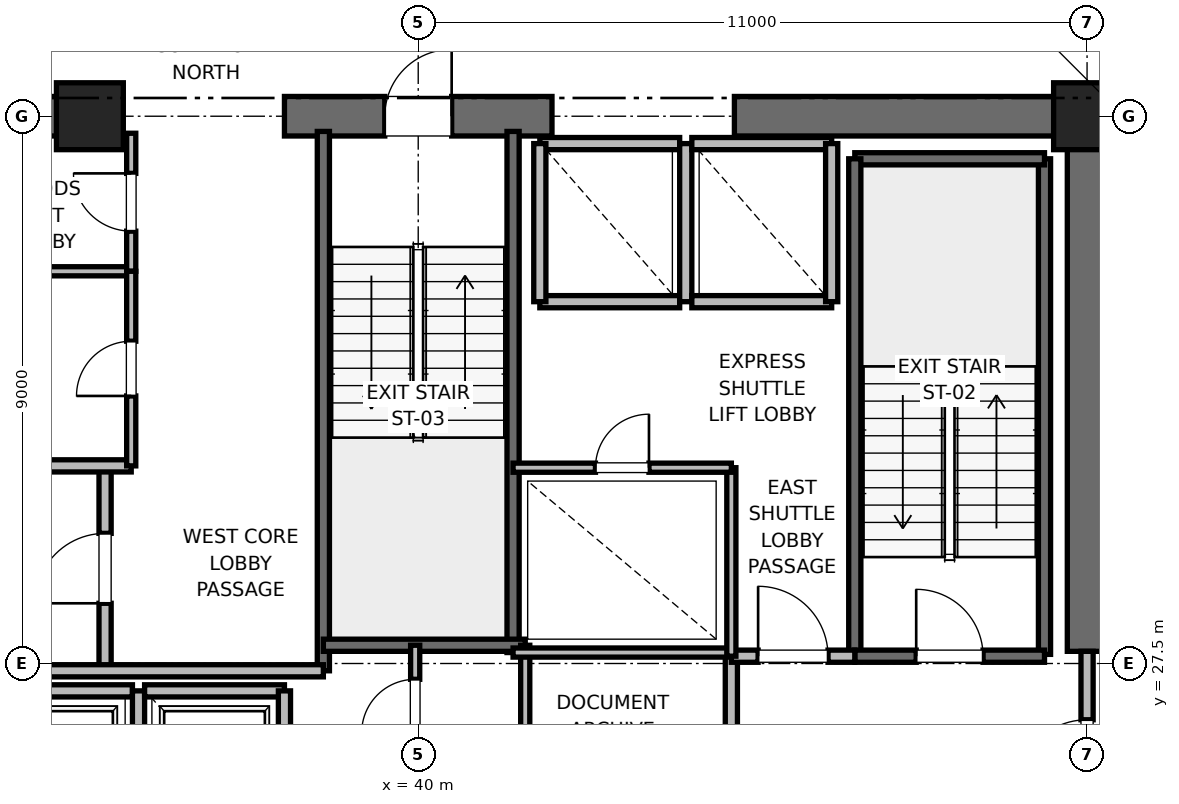
"""IFC4 building model, lengths in metres.
Left out: names, types, materials, properties, quantities, classifications, styles, units other than length and angle.
Written with IfcOpenShell. Run it as: python <this file> out.ifc"""

import sys

from ifc_helpers import new_model, si_unit, direction, frame, frame_2d, origin, origin_2d, place, context, subcontext, project, spatial, rectangle, extrude, element, fill, save


model = new_model("IFC4")
c1 = context("Model", 3, precision=1e-05, world=origin(), true_north=direction((0.0, 1.0)))
c2 = subcontext(c1, "Body", "Model", "MODEL_VIEW")
j1 = project(units=[si_unit("LENGTHUNIT", "METRE"), si_unit("PLANEANGLEUNIT", "RADIAN")], contexts=[c1])
p1 = place(None, origin())
s1 = spatial("IfcSite", under=j1, at=p1, CompositionType="ELEMENT")
p2 = place(p1, origin())
s2 = spatial("IfcBuilding", under=s1, at=p2, CompositionType="ELEMENT")
p3 = place(p2, frame((0.0, 0.0, 103.6)))
s3 = spatial("IfcBuildingStorey", under=s2, at=p3, CompositionType="ELEMENT", Elevation=103.6)
for number, where, z_axis, x_axis in (
    (1, (51.0, 36.5, 0.0), (0.0, 0.0, 1.0), (1.0, 0.0, 0.0)),
    (2, (34.6, 36.5, 0.0), (0.0, 0.0, 1.0), (1.0, 0.0, 0.0)),
):
    element("IfcColumn", number, at=place(p3, frame(where, z_axis=z_axis, x_axis=x_axis)), inside=s3, PredefinedType="PILASTER", context=c2, shape_type="SweptSolid", body=[
        extrude(rectangle(XDim=1.1, YDim=1.1, at=origin_2d()), origin(), (0.0, 0.0, 1.0), 4.0),
    ])
p4 = place(p3, frame((29.0, 36.5, 0.0), z_axis=(0.0, 0.0, 1.0), x_axis=(1.0, 0.0, 0.0)))
e3 = element("IfcWall", 3, at=p4, inside=s3, PredefinedType="SHEAR", context=c2, shape_type="SweptSolid", body=[
    extrude(rectangle(XDim=5.8, YDim=0.65, at=frame_2d((2.9, 0.0))), origin(), (0.0, 0.0, 1.0), 3.7),
])
p5 = place(p3, frame((37.8, 36.5, 0.0), z_axis=(0.0, 0.0, 1.0), x_axis=(1.0, 0.0, 0.0)))
e4 = element("IfcWall", 4, at=p5, inside=s3, PredefinedType="SHEAR", context=c2, shape_type="SweptSolid", body=[
    extrude(rectangle(XDim=4.4, YDim=0.65, at=frame_2d((2.2, 0.0))), origin(), (0.0, 0.0, 1.0), 3.7),
])
p6 = place(p5, frame((1.65, 0.0, 0.0)))
e5 = element("IfcOpeningElement", 5, at=p6, cuts=e4, PredefinedType="OPENING", context=c2, shape_type="SweptSolid", body=[
    extrude(rectangle(XDim=1.1, YDim=2.15, at=frame_2d((0.55, 1.075))), frame((0.0, 0.325, 0.0), z_axis=(0.0, -1.0, 0.0), x_axis=(1.0, 0.0, 0.0)), (0.0, 0.0, 1.0), 0.65),
])
p7 = place(p3, frame((45.2, 36.5, 0.0), z_axis=(0.0, 0.0, 1.0), x_axis=(1.0, 0.0, 0.0)))
e6 = element("IfcWall", 6, at=p7, inside=s3, PredefinedType="SHEAR", context=c2, shape_type="SweptSolid", body=[
    extrude(rectangle(XDim=5.8, YDim=0.65, at=frame_2d((2.9, 0.0))), origin(), (0.0, 0.0, 1.0), 3.7),
])
p8 = place(p3, frame((51.0, 27.7, 0.0), z_axis=(0.0, 0.0, 1.0), x_axis=(0.0, 1.0, 0.0)))
e7 = element("IfcWall", 7, at=p8, inside=s3, PredefinedType="SHEAR", context=c2, shape_type="SweptSolid", body=[
    extrude(rectangle(XDim=8.8, YDim=0.65, at=frame_2d((4.4, 0.0))), origin(), (0.0, 0.0, 1.0), 3.7),
])
p9 = place(p3, frame((50.3, 27.65, 0.0), z_axis=(0.0, 0.0, 1.0), x_axis=(0.0, 1.0, 0.0)))
e8 = element("IfcWall", 8, at=p9, inside=s3, PredefinedType="SOLIDWALL", context=c2, shape_type="SweptSolid", body=[
    extrude(rectangle(XDim=8.15, YDim=0.2, at=frame_2d((4.075, 0.0))), origin(), (0.0, 0.0, 1.0), 3.7),
])
p10 = place(p3, frame((47.18, 35.8, 0.0), z_axis=(0.0, 0.0, 1.0), x_axis=(1.0, 0.0, 0.0)))
e9 = element("IfcWall", 9, at=p10, inside=s3, PredefinedType="SOLIDWALL", context=c2, shape_type="SweptSolid", body=[
    extrude(rectangle(XDim=3.12, YDim=0.2, at=frame_2d((1.56, 0.0))), origin(), (0.0, 0.0, 1.0), 3.7),
])
p11 = place(p3, frame((47.18, 27.62, 0.0), z_axis=(0.0, 0.0, 1.0), x_axis=(0.0, 1.0, 0.0)))
e10 = element("IfcWall", 10, at=p11, inside=s3, PredefinedType="SOLIDWALL", context=c2, shape_type="SweptSolid", body=[
    extrude(rectangle(XDim=8.18, YDim=0.2, at=frame_2d((4.09, 0.0))), origin(), (0.0, 0.0, 1.0), 3.7),
])
p12 = place(p3, frame((47.18, 27.62, 0.0), z_axis=(0.0, 0.0, 1.0), x_axis=(1.0, 0.0, 0.0)))
e11 = element("IfcWall", 11, at=p12, inside=s3, PredefinedType="SOLIDWALL", context=c2, shape_type="SweptSolid", body=[
    extrude(rectangle(XDim=3.12, YDim=0.2, at=frame_2d((1.56, 0.0))), origin(), (0.0, 0.0, 1.0), 3.7),
])
p13 = place(p12, frame((1.01, 0.0, 0.0)))
e12 = element("IfcOpeningElement", 12, at=p13, cuts=e11, PredefinedType="OPENING", context=c2, shape_type="SweptSolid", body=[
    extrude(rectangle(XDim=1.1, YDim=2.15, at=frame_2d((0.55, 1.075))), frame((0.0, 0.1, 0.0), z_axis=(0.0, -1.0, 0.0), x_axis=(1.0, 0.0, 0.0)), (0.0, 0.0, 1.0), 0.2),
])
p14 = place(p3, frame((38.44, 27.38, 0.0), z_axis=(0.0, 0.0, 1.0), x_axis=(0.0, 1.0, 0.0)))
e13 = element("IfcWall", 13, at=p14, inside=s3, PredefinedType="SOLIDWALL", context=c2, shape_type="SweptSolid", body=[
    extrude(rectangle(XDim=8.87, YDim=0.2, at=frame_2d((4.435, 0.0))), origin(), (0.0, 0.0, 1.0), 3.7),
])
p15 = place(p3, frame((41.56, 27.68, 0.0), z_axis=(0.0, 0.0, 1.0), x_axis=(0.0, 1.0, 0.0)))
e14 = element("IfcWall", 14, at=p15, inside=s3, PredefinedType="SOLIDWALL", context=c2, shape_type="SweptSolid", body=[
    extrude(rectangle(XDim=8.57, YDim=0.2, at=frame_2d((4.285, 0.0))), origin(), (0.0, 0.0, 1.0), 3.7),
])
p16 = place(p3, frame((38.44, 27.8, 0.0), z_axis=(0.0, 0.0, 1.0), x_axis=(1.0, 0.0, 0.0)))
e15 = element("IfcWall", 15, at=p16, inside=s3, PredefinedType="SOLIDWALL", context=c2, shape_type="SweptSolid", body=[
    extrude(rectangle(XDim=3.32, YDim=0.2, at=frame_2d((1.66, 0.0))), origin(), (0.0, 0.0, 1.0), 3.7),
])
p17 = place(p3, frame((34.85, 27.38, 0.0), z_axis=(0.0, 0.0, 1.0), x_axis=(0.0, 1.0, 0.0)))
e16 = element("IfcWall", 16, at=p17, inside=s3, PredefinedType="PARTITIONING", context=c2, shape_type="SweptSolid", body=[
    extrude(rectangle(XDim=3.37, YDim=0.2, at=frame_2d((1.685, 0.0))), origin(), (0.0, 0.0, 1.0), 3.7),
])
p18 = place(p17, frame((1.11, 0.0, 0.0)))
e17 = element("IfcOpeningElement", 17, at=p18, cuts=e16, PredefinedType="OPENING", context=c2, shape_type="SweptSolid", body=[
    extrude(rectangle(XDim=1.15, YDim=2.2, at=frame_2d((0.575, 1.1))), frame((0.0, 0.1, 0.0), z_axis=(0.0, -1.0, 0.0), x_axis=(1.0, 0.0, 0.0)), (0.0, 0.0, 1.0), 0.2),
])
p19 = place(p3, frame((32.82, 27.38, 0.0), z_axis=(0.0, 0.0, 1.0), x_axis=(1.0, 0.0, 0.0)))
e18 = element("IfcWall", 18, at=p19, inside=s3, PredefinedType="PARTITIONING", context=c2, shape_type="SweptSolid", body=[
    extrude(rectangle(XDim=5.62, YDim=0.2, at=frame_2d((2.81, 0.0))), origin(), (0.0, 0.0, 1.0), 3.7),
])
p20 = place(p3, frame((32.15, 30.75, 0.0), z_axis=(0.0, 0.0, 1.0), x_axis=(1.0, 0.0, 0.0)))
e19 = element("IfcWall", 19, at=p20, inside=s3, PredefinedType="PARTITIONING", context=c2, shape_type="SweptSolid", body=[
    extrude(rectangle(XDim=3.13, YDim=0.2, at=frame_2d((1.565, 0.0))), origin(), (0.0, 0.0, 1.0), 3.7),
])
p21 = place(p3, frame((45.15, 24.25, 0.0), z_axis=(0.0, 0.0, 1.0), x_axis=(0.0, 1.0, 0.0)))
e20 = element("IfcWall", 20, at=p21, inside=s3, PredefinedType="PARTITIONING", context=c2, shape_type="SweptSolid", body=[
    extrude(rectangle(XDim=3.37, YDim=0.2, at=frame_2d((1.685, 0.0))), origin(), (0.0, 0.0, 1.0), 3.7),
])
p22 = place(p3, frame((45.15, 27.62, 0.0), z_axis=(0.0, 0.0, 1.0), x_axis=(1.0, 0.0, 0.0)))
e21 = element("IfcWall", 21, at=p22, inside=s3, PredefinedType="PARTITIONING", context=c2, shape_type="SweptSolid", body=[
    extrude(rectangle(XDim=2.03, YDim=0.2, at=frame_2d((1.015, 0.0))), origin(), (0.0, 0.0, 1.0), 3.7),
])
p23 = place(p22, frame((0.44, 0.0, 0.0)))
e22 = element("IfcOpeningElement", 22, at=p23, cuts=e21, PredefinedType="OPENING", context=c2, shape_type="SweptSolid", body=[
    extrude(rectangle(XDim=1.15, YDim=2.2, at=frame_2d((0.575, 1.1))), frame((0.0, 0.1, 0.0), z_axis=(0.0, -1.0, 0.0), x_axis=(1.0, 0.0, 0.0)), (0.0, 0.0, 1.0), 0.2),
])
p24 = place(p3, frame((51.0, 24.3, 0.0), z_axis=(0.0, 0.0, 1.0), x_axis=(0.0, 1.0, 0.0)))
e23 = element("IfcWall", 23, at=p24, inside=s3, PredefinedType="PARTITIONING", context=c2, shape_type="SweptSolid", body=[
    extrude(rectangle(XDim=3.4, YDim=0.2, at=frame_2d((1.7, 0.0))), origin(), (0.0, 0.0, 1.0), 2.48),
])
p25 = place(p24, frame((1.125, 0.0, 0.0)))
e24 = element("IfcOpeningElement", 24, at=p25, cuts=e23, PredefinedType="OPENING", context=c2, shape_type="SweptSolid", body=[
    extrude(rectangle(XDim=1.15, YDim=2.2, at=frame_2d((0.575, 1.1))), frame((0.0, 0.1, 0.0), z_axis=(0.0, -1.0, 0.0), x_axis=(1.0, 0.0, 0.0)), (0.0, 0.0, 1.0), 0.2),
])
p26 = place(p3, frame((35.3, 27.05, 0.0), z_axis=(0.0, 0.0, 1.0), x_axis=(-1.0, 0.0, 0.0)))
e25 = element("IfcWall", 25, at=p26, inside=s3, PredefinedType="SOLIDWALL", context=c2, shape_type="SweptSolid", body=[
    extrude(rectangle(XDim=2.3, YDim=0.2, at=frame_2d((1.15, 0.0))), origin(), (0.0, 0.0, 1.0), 3.7),
])
p27 = place(p3, frame((35.4, 24.45, 0.0), z_axis=(0.0, 0.0, 1.0), x_axis=(0.0, 1.0, 0.0)))
e26 = element("IfcWall", 26, at=p27, inside=s3, PredefinedType="SOLIDWALL", context=c2, shape_type="SweptSolid", body=[
    extrude(rectangle(XDim=2.6, YDim=0.2, at=frame_2d((1.3, 0.0))), origin(), (0.0, 0.0, 1.0), 3.7),
])
p28 = place(p3, frame((37.8, 27.05, 0.0), z_axis=(0.0, 0.0, 1.0), x_axis=(-1.0, 0.0, 0.0)))
e27 = element("IfcWall", 27, at=p28, inside=s3, PredefinedType="SOLIDWALL", context=c2, shape_type="SweptSolid", body=[
    extrude(rectangle(XDim=2.3, YDim=0.2, at=frame_2d((1.15, 0.0))), origin(), (0.0, 0.0, 1.0), 3.7),
])
p29 = place(p3, frame((37.8, 24.45, 0.0), z_axis=(0.0, 0.0, 1.0), x_axis=(0.0, 1.0, 0.0)))
e28 = element("IfcWall", 28, at=p29, inside=s3, PredefinedType="SOLIDWALL", context=c2, shape_type="SweptSolid", body=[
    extrude(rectangle(XDim=2.6, YDim=0.2, at=frame_2d((1.3, 0.0))), origin(), (0.0, 0.0, 1.0), 3.7),
])
p30 = place(p3, frame((42.0, 33.45, 0.0), z_axis=(0.0, 0.0, 1.0), x_axis=(1.0, 0.0, 0.0)))
e29 = element("IfcWall", 29, at=p30, inside=s3, PredefinedType="SOLIDWALL", context=c2, shape_type="SweptSolid", body=[
    extrude(rectangle(XDim=2.3, YDim=0.2, at=frame_2d((1.15, 0.0))), origin(), (0.0, 0.0, 1.0), 3.7),
])
p31 = place(p3, frame((44.3, 36.05, 0.0), z_axis=(0.0, 0.0, 1.0), x_axis=(-1.0, 0.0, 0.0)))
e30 = element("IfcWall", 30, at=p31, inside=s3, PredefinedType="SOLIDWALL", context=c2, shape_type="SweptSolid", body=[
    extrude(rectangle(XDim=2.3, YDim=0.2, at=frame_2d((1.15, 0.0))), origin(), (0.0, 0.0, 1.0), 2.48),
])
for number, where, z_axis, x_axis in (
    (31, (42.0, 36.05, 0.0), (0.0, 0.0, 1.0), (0.0, -1.0, 0.0)),
    (32, (44.4, 33.45, 0.0), (0.0, 0.0, 1.0), (0.0, 1.0, 0.0)),
):
    element("IfcWall", number, at=place(p3, frame(where, z_axis=z_axis, x_axis=x_axis)), inside=s3, PredefinedType="SOLIDWALL", context=c2, shape_type="SweptSolid", body=[
        extrude(rectangle(XDim=2.6, YDim=0.2, at=frame_2d((1.3, 0.0))), origin(), (0.0, 0.0, 1.0), 2.48),
    ])
p32 = place(p3, frame((44.5, 33.45, 0.0), z_axis=(0.0, 0.0, 1.0), x_axis=(1.0, 0.0, 0.0)))
e33 = element("IfcWall", 33, at=p32, inside=s3, PredefinedType="SOLIDWALL", context=c2, shape_type="SweptSolid", body=[
    extrude(rectangle(XDim=2.3, YDim=0.2, at=frame_2d((1.15, 0.0))), origin(), (0.0, 0.0, 1.0), 3.7),
])
p33 = place(p3, frame((46.8, 36.05, 0.0), z_axis=(0.0, 0.0, 1.0), x_axis=(-1.0, 0.0, 0.0)))
e34 = element("IfcWall", 34, at=p33, inside=s3, PredefinedType="SOLIDWALL", context=c2, shape_type="SweptSolid", body=[
    extrude(rectangle(XDim=2.3, YDim=0.2, at=frame_2d((1.15, 0.0))), origin(), (0.0, 0.0, 1.0), 2.48),
])
p34 = place(p3, frame((46.8, 33.45, 0.0), z_axis=(0.0, 0.0, 1.0), x_axis=(0.0, 1.0, 0.0)))
e35 = element("IfcWall", 35, at=p34, inside=s3, PredefinedType="SOLIDWALL", context=c2, shape_type="SweptSolid", body=[
    extrude(rectangle(XDim=2.6, YDim=0.2, at=frame_2d((1.3, 0.0))), origin(), (0.0, 0.0, 1.0), 3.7),
])
p35 = place(p3, frame((41.76, 23.8, 0.0), z_axis=(0.0, 0.0, 1.0), x_axis=(0.0, 1.0, 0.0)))
e36 = element("IfcWall", 36, at=p35, inside=s3, PredefinedType="PARTITIONING", context=c2, shape_type="SweptSolid", body=[
    extrude(rectangle(XDim=4.0, YDim=0.15, at=frame_2d((2.0, 0.0))), origin(), (0.0, 0.0, 1.0), 2.85),
])
p36 = place(p3, frame((39.95, 25.8, 0.0), z_axis=(0.0, 0.0, 1.0), x_axis=(0.0, 1.0, 0.0)))
e37 = element("IfcWall", 37, at=p36, inside=s3, PredefinedType="PARTITIONING", context=c2, shape_type="SweptSolid", body=[
    extrude(rectangle(XDim=2.0, YDim=0.15, at=frame_2d((1.0, 0.0))), origin(), (0.0, 0.0, 1.0), 2.85),
])
p37 = place(p36, frame((0.56, 0.0, 0.0)))
e38 = element("IfcOpeningElement", 38, at=p37, cuts=e37, PredefinedType="OPENING", context=c2, shape_type="SweptSolid", body=[
    extrude(rectangle(XDim=0.88, YDim=2.1, at=frame_2d((0.44, 1.05))), frame((0.0, 0.075, 0.0), z_axis=(0.0, -1.0, 0.0), x_axis=(1.0, 0.0, 0.0)), (0.0, 0.0, 1.0), 0.15),
])
p38 = place(p3, frame((32.15, 33.95, 0.0), z_axis=(0.0, 0.0, 1.0), x_axis=(1.0, 0.0, 0.0)))
e39 = element("IfcWall", 39, at=p38, inside=s3, PredefinedType="PARTITIONING", context=c2, shape_type="SweptSolid", body=[
    extrude(rectangle(XDim=3.13, YDim=0.15, at=frame_2d((1.565, 0.0))), origin(), (0.0, 0.0, 1.0), 2.85),
])
p39 = place(p3, frame((35.28, 33.95, 0.0), z_axis=(0.0, 0.0, 1.0), x_axis=(0.0, 1.0, 0.0)))
e40 = element("IfcWall", 40, at=p39, inside=s3, PredefinedType="PARTITIONING", context=c2, shape_type="SweptSolid", body=[
    extrude(rectangle(XDim=2.27, YDim=0.15, at=frame_2d((1.135, 0.0))), origin(), (0.0, 0.0, 1.0), 2.48),
])
p40 = place(p39, frame((0.66, 0.0, 0.0)))
e41 = element("IfcOpeningElement", 41, at=p40, cuts=e40, PredefinedType="OPENING", context=c2, shape_type="SweptSolid", body=[
    extrude(rectangle(XDim=0.95, YDim=2.15, at=frame_2d((0.475, 1.075))), frame((0.0, 0.075, 0.0), z_axis=(0.0, -1.0, 0.0), x_axis=(1.0, 0.0, 0.0)), (0.0, 0.0, 1.0), 0.15),
])
p41 = place(p3, frame((35.28, 30.75, 0.0), z_axis=(0.0, 0.0, 1.0), x_axis=(0.0, 1.0, 0.0)))
e42 = element("IfcWall", 42, at=p41, inside=s3, PredefinedType="PARTITIONING", context=c2, shape_type="SweptSolid", body=[
    extrude(rectangle(XDim=3.2, YDim=0.15, at=frame_2d((1.6, 0.0))), origin(), (0.0, 0.0, 1.0), 2.85),
])
p42 = place(p41, frame((1.15, 0.0, 0.0)))
e43 = element("IfcOpeningElement", 43, at=p42, cuts=e42, PredefinedType="OPENING", context=c2, shape_type="SweptSolid", body=[
    extrude(rectangle(XDim=0.9, YDim=2.1, at=frame_2d((0.45, 1.05))), frame((0.0, 0.075, 0.0), z_axis=(0.0, -1.0, 0.0), x_axis=(1.0, 0.0, 0.0)), (0.0, 0.0, 1.0), 0.15),
])
p43 = place(p3, frame((41.56, 27.68, 0.0), z_axis=(0.0, 0.0, 1.0), x_axis=(1.0, 0.0, 0.0)))
e44 = element("IfcWall", 44, at=p43, inside=s3, PredefinedType="PARTITIONING", context=c2, shape_type="SweptSolid", body=[
    extrude(rectangle(XDim=3.59, YDim=0.15, at=frame_2d((1.795, 0.0))), origin(), (0.0, 0.0, 1.0), 2.85),
])
p44 = place(p3, frame((45.15, 27.62, 0.0), z_axis=(0.0, 0.0, 1.0), x_axis=(0.0, 1.0, 0.0)))
e45 = element("IfcWall", 45, at=p44, inside=s3, PredefinedType="PARTITIONING", context=c2, shape_type="SweptSolid", body=[
    extrude(rectangle(XDim=3.1, YDim=0.15, at=frame_2d((1.55, 0.0))), origin(), (0.0, 0.0, 1.0), 2.85),
])
p45 = place(p3, frame((41.56, 30.72, 0.0), z_axis=(0.0, 0.0, 1.0), x_axis=(1.0, 0.0, 0.0)))
e46 = element("IfcWall", 46, at=p45, inside=s3, PredefinedType="PARTITIONING", context=c2, shape_type="SweptSolid", body=[
    extrude(rectangle(XDim=3.59, YDim=0.15, at=frame_2d((1.795, 0.0))), origin(), (0.0, 0.0, 1.0), 2.85),
])
p46 = place(p45, frame((1.355, 0.0, 0.0)))
e47 = element("IfcOpeningElement", 47, at=p46, cuts=e46, PredefinedType="OPENING", context=c2, shape_type="SweptSolid", body=[
    extrude(rectangle(XDim=0.88, YDim=2.1, at=frame_2d((0.44, 1.05))), frame((0.0, 0.075, 0.0), z_axis=(0.0, -1.0, 0.0), x_axis=(1.0, 0.0, 0.0)), (0.0, 0.0, 1.0), 0.15),
])
p47 = place(p13, origin())
e48 = element("IfcDoor", 48, at=p47, inside=s3, OperationType="SINGLE_SWING_LEFT", PredefinedType="DOOR", context=c2, shape_type="SweptSolid", body=[
    extrude(rectangle(XDim=1.1, YDim=2.15, at=frame_2d((0.55, 1.075))), frame((0.0, 0.025, 0.0), z_axis=(0.0, -1.0, 0.0), x_axis=(1.0, 0.0, 0.0)), (0.0, 0.0, 1.0), 0.05),
])
fill(e12, e48)
p48 = place(p6, origin())
e49 = element("IfcDoor", 49, at=p48, inside=s3, OperationType="SINGLE_SWING_RIGHT", PredefinedType="DOOR", context=c2, shape_type="SweptSolid", body=[
    extrude(rectangle(XDim=1.1, YDim=2.15, at=frame_2d((0.55, 1.075))), frame((0.0, 0.025, 0.0), z_axis=(0.0, -1.0, 0.0), x_axis=(1.0, 0.0, 0.0)), (0.0, 0.0, 1.0), 0.05),
])
fill(e5, e49)
p49 = place(p18, origin())
e50 = element("IfcDoor", 50, at=p49, inside=s3, OperationType="SINGLE_SWING_LEFT", PredefinedType="DOOR", context=c2, shape_type="SweptSolid", body=[
    extrude(rectangle(XDim=1.15, YDim=2.2, at=frame_2d((0.575, 1.1))), frame((0.0, 0.025, 0.0), z_axis=(0.0, -1.0, 0.0), x_axis=(1.0, 0.0, 0.0)), (0.0, 0.0, 1.0), 0.05),
])
fill(e17, e50)
p50 = place(p23, origin())
e51 = element("IfcDoor", 51, at=p50, inside=s3, OperationType="SINGLE_SWING_LEFT", PredefinedType="DOOR", context=c2, shape_type="SweptSolid", body=[
    extrude(rectangle(XDim=1.15, YDim=2.2, at=frame_2d((0.575, 1.1))), frame((0.0, 0.025, 0.0), z_axis=(0.0, -1.0, 0.0), x_axis=(1.0, 0.0, 0.0)), (0.0, 0.0, 1.0), 0.05),
])
fill(e22, e51)
p51 = place(p25, origin())
e52 = element("IfcDoor", 52, at=p51, inside=s3, OperationType="SINGLE_SWING_LEFT", PredefinedType="DOOR", context=c2, shape_type="SweptSolid", body=[
    extrude(rectangle(XDim=1.15, YDim=2.2, at=frame_2d((0.575, 1.1))), frame((0.0, 0.025, 0.0), z_axis=(0.0, -1.0, 0.0), x_axis=(1.0, 0.0, 0.0)), (0.0, 0.0, 1.0), 0.05),
])
fill(e24, e52)
p52 = place(p37, origin())
e53 = element("IfcDoor", 53, at=p52, inside=s3, OperationType="SINGLE_SWING_LEFT", PredefinedType="DOOR", context=c2, shape_type="SweptSolid", body=[
    extrude(rectangle(XDim=0.88, YDim=2.1, at=frame_2d((0.44, 1.05))), frame((0.0, 0.025, 0.0), z_axis=(0.0, -1.0, 0.0), x_axis=(1.0, 0.0, 0.0)), (0.0, 0.0, 1.0), 0.05),
])
fill(e38, e53)
p53 = place(p40, origin())
e54 = element("IfcDoor", 54, at=p53, inside=s3, OperationType="SINGLE_SWING_RIGHT", PredefinedType="DOOR", context=c2, shape_type="SweptSolid", body=[
    extrude(rectangle(XDim=0.95, YDim=2.15, at=frame_2d((0.475, 1.075))), frame((0.0, 0.025, 0.0), z_axis=(0.0, -1.0, 0.0), x_axis=(1.0, 0.0, 0.0)), (0.0, 0.0, 1.0), 0.05),
])
fill(e41, e54)
p54 = place(p42, origin())
e55 = element("IfcDoor", 55, at=p54, inside=s3, OperationType="SINGLE_SWING_LEFT", PredefinedType="DOOR", context=c2, shape_type="SweptSolid", body=[
    extrude(rectangle(XDim=0.9, YDim=2.1, at=frame_2d((0.45, 1.05))), frame((0.0, 0.025, 0.0), z_axis=(0.0, -1.0, 0.0), x_axis=(1.0, 0.0, 0.0)), (0.0, 0.0, 1.0), 0.05),
])
fill(e43, e55)
p55 = place(p46, origin())
e56 = element("IfcDoor", 56, at=p55, inside=s3, OperationType="SINGLE_SWING_RIGHT", PredefinedType="DOOR", context=c2, shape_type="SweptSolid", body=[
    extrude(rectangle(XDim=0.88, YDim=2.1, at=frame_2d((0.44, 1.05))), frame((0.0, 0.025, 0.0), z_axis=(0.0, -1.0, 0.0), x_axis=(1.0, 0.0, 0.0)), (0.0, 0.0, 1.0), 0.05),
])
fill(e47, e56)
save(model, sys.argv[1])
